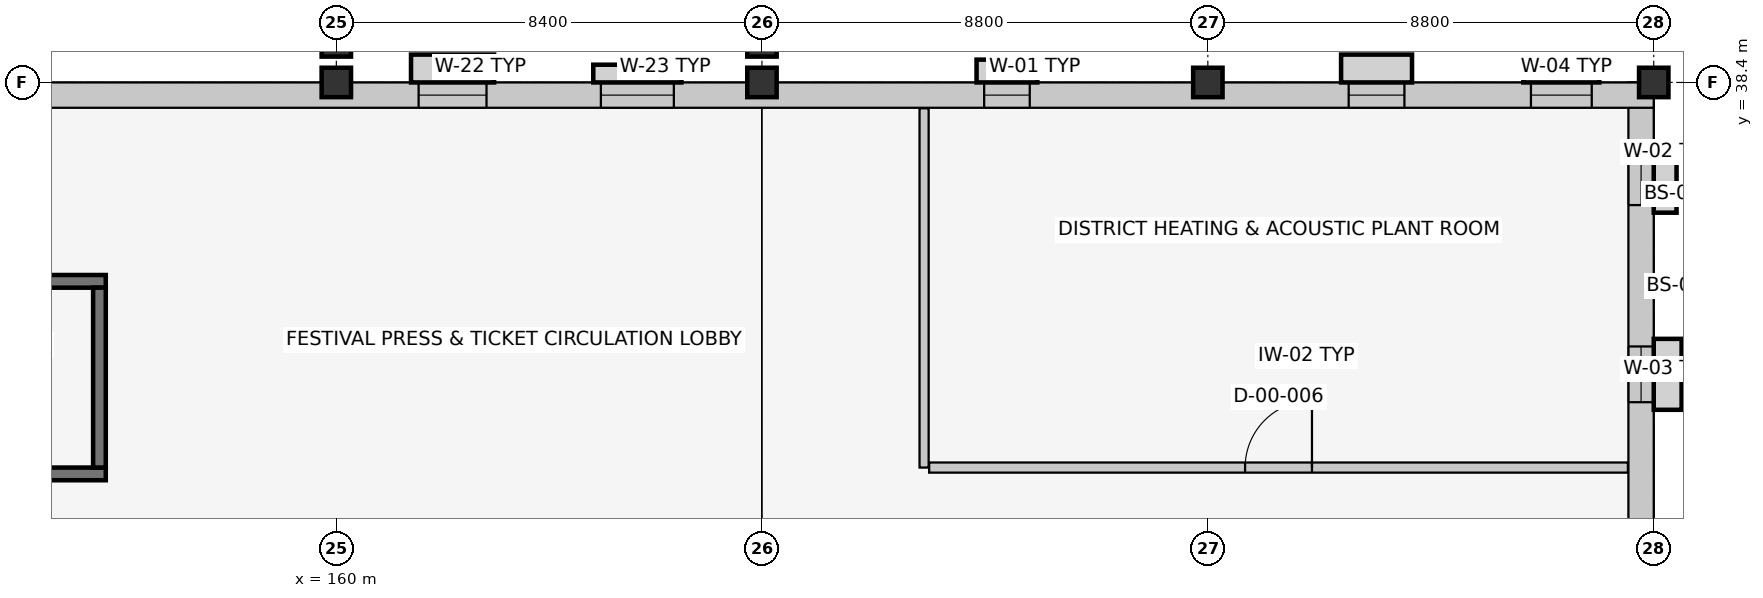
"""IFC4 building model, lengths in metres.
Left out: names, types, materials, properties, quantities, classifications, styles, units other than length and angle.
Written with IfcOpenShell. Run it as: python <this file> out.ifc"""

import sys

from ifc_helpers import new_model, si_unit, direction, frame, frame_2d, origin, origin_2d, place, context, subcontext, project, spatial, rectangle, extrude, element, fill, save


model = new_model("IFC4")
c1 = context("Model", 3, precision=1e-05, world=origin(), true_north=direction((0.0, 1.0)))
c2 = subcontext(c1, "Body", "Model", "MODEL_VIEW")
j1 = project(units=[si_unit("LENGTHUNIT", "METRE"), si_unit("PLANEANGLEUNIT", "RADIAN")], contexts=[c1])
p1 = place(None, origin())
s1 = spatial("IfcSite", under=j1, at=p1, CompositionType="ELEMENT")
p2 = place(p1, origin())
s2 = spatial("IfcBuilding", under=s1, at=p2, CompositionType="ELEMENT")
p3 = place(p2, origin())
s3 = spatial("IfcBuildingStorey", under=s2, at=p3, CompositionType="ELEMENT", Elevation=0.0)
for number, where, z_axis, x_axis in (
    (1, (160.0, 38.4, 0.0), (0.0, 0.0, 1.0), (1.0, 0.0, 0.0)),
    (2, (168.4, 38.4, 0.0), (0.0, 0.0, 1.0), (1.0, 0.0, 0.0)),
    (3, (177.2, 38.4, 0.0), (0.0, 0.0, 1.0), (1.0, 0.0, 0.0)),
    (4, (186.0, 38.4, 0.0), (0.0, 0.0, 1.0), (1.0, 0.0, 0.0)),
    (5, (160.0, 39.2, 0.0), (0.0, 0.0, 1.0), (1.0, 0.0, 0.0)),
    (6, (168.4, 39.2, 0.0), (0.0, 0.0, 1.0), (1.0, 0.0, 0.0)),
):
    element("IfcColumn", number, at=place(p3, frame(where, z_axis=z_axis, x_axis=x_axis)), inside=s3, PredefinedType="COLUMN", context=c2, shape_type="SweptSolid", body=[
        extrude(rectangle(XDim=0.58, YDim=0.58, at=origin_2d()), origin(), (0.0, 0.0, 1.0), 5.4),
    ])
p4 = place(p3, frame((185.75, 38.4, 0.0), z_axis=(0.0, 0.0, 1.0), x_axis=(0.0, -1.0, 0.0)))
e7 = element("IfcWall", 7, at=p4, inside=s3, PredefinedType="SOLIDWALL", context=c2, shape_type="SweptSolid", body=[
    extrude(rectangle(XDim=38.4, YDim=0.5, at=frame_2d((19.2, 0.0))), origin(), (0.0, 0.0, 1.0), 4.275),
])
p5 = place(p4, frame((1.42, 0.0, 0.9)))
e8 = element("IfcOpeningElement", 8, at=p5, cuts=e7, PredefinedType="OPENING", context=c2, shape_type="SweptSolid", body=[
    extrude(rectangle(XDim=1.0, YDim=1.35, at=frame_2d((0.5, 0.675))), frame((0.0, 0.262, 0.0), z_axis=(0.0, -1.0, 0.0), x_axis=(1.0, 0.0, 0.0)), (0.0, 0.0, 1.0), 0.524),
])
p6 = place(p4, frame((5.21, 0.0, 0.9)))
e9 = element("IfcOpeningElement", 9, at=p6, cuts=e7, PredefinedType="OPENING", context=c2, shape_type="SweptSolid", body=[
    extrude(rectangle(XDim=1.1, YDim=1.35, at=frame_2d((0.55, 0.675))), frame((0.0, 0.262, 0.0), z_axis=(0.0, -1.0, 0.0), x_axis=(1.0, 0.0, 0.0)), (0.0, 0.0, 1.0), 0.524),
])
p7 = place(p4, frame((20.645, 0.0, 0.9)))
e10 = element("IfcOpeningElement", 10, at=p7, cuts=e7, PredefinedType="OPENING", context=c2, shape_type="SweptSolid", body=[
    extrude(rectangle(XDim=0.95, YDim=1.45, at=frame_2d((0.475, 0.725))), frame((0.0, 0.262, 0.0), z_axis=(0.0, -1.0, 0.0), x_axis=(1.0, 0.0, 0.0)), (0.0, 0.0, 1.0), 0.524),
])
p8 = place(p4, frame((28.225, 0.0, 0.9)))
e11 = element("IfcOpeningElement", 11, at=p8, cuts=e7, PredefinedType="OPENING", context=c2, shape_type="SweptSolid", body=[
    extrude(rectangle(XDim=1.15, YDim=1.45, at=frame_2d((0.575, 0.725))), frame((0.0, 0.262, 0.0), z_axis=(0.0, -1.0, 0.0), x_axis=(1.0, 0.0, 0.0)), (0.0, 0.0, 1.0), 0.524),
])
p9 = place(p4, frame((35.805, 0.0, 0.9)))
e12 = element("IfcOpeningElement", 12, at=p9, cuts=e7, PredefinedType="OPENING", context=c2, shape_type="SweptSolid", body=[
    extrude(rectangle(XDim=1.35, YDim=1.45, at=frame_2d((0.675, 0.725))), frame((0.0, 0.262, 0.0), z_axis=(0.0, -1.0, 0.0), x_axis=(1.0, 0.0, 0.0)), (0.0, 0.0, 1.0), 0.524),
])
p10 = place(p3, frame((124.0, 38.15, 0.0), z_axis=(0.0, 0.0, 1.0), x_axis=(1.0, 0.0, 0.0)))
e13 = element("IfcWall", 13, at=p10, inside=s3, PredefinedType="SOLIDWALL", context=c2, shape_type="SweptSolid", body=[
    extrude(rectangle(XDim=62.0, YDim=0.5, at=frame_2d((31.0, 0.0))), origin(), (0.0, 0.0, 1.0), 4.275),
])
p11 = place(p10, frame((17.1, 0.0, 0.0)))
e14 = element("IfcOpeningElement", 14, at=p11, cuts=e13, PredefinedType="OPENING", context=c2, shape_type="SweptSolid", body=[
    extrude(rectangle(XDim=1.8, YDim=2.3, at=frame_2d((0.9, 1.15))), frame((0.0, 0.262, 0.0), z_axis=(0.0, -1.0, 0.0), x_axis=(1.0, 0.0, 0.0)), (0.0, 0.0, 1.0), 0.524),
])
p12 = place(p10, frame((1.098, 0.0, 0.9)))
e15 = element("IfcOpeningElement", 15, at=p12, cuts=e13, PredefinedType="OPENING", context=c2, shape_type="SweptSolid", body=[
    extrude(rectangle(XDim=1.45, YDim=1.45, at=frame_2d((0.725, 0.725))), frame((0.0, 0.262, 0.0), z_axis=(0.0, -1.0, 0.0), x_axis=(1.0, 0.0, 0.0)), (0.0, 0.0, 1.0), 0.524),
])
p13 = place(p10, frame((26.853, 0.0, 0.9)))
e16 = element("IfcOpeningElement", 16, at=p13, cuts=e13, PredefinedType="OPENING", context=c2, shape_type="SweptSolid", body=[
    extrude(rectangle(XDim=1.0, YDim=1.75, at=frame_2d((0.5, 0.875))), frame((0.0, 0.262, 0.0), z_axis=(0.0, -1.0, 0.0), x_axis=(1.0, 0.0, 0.0)), (0.0, 0.0, 1.0), 0.524),
])
p14 = place(p10, frame((37.624, 0.0, 0.9)))
e17 = element("IfcOpeningElement", 17, at=p14, cuts=e13, PredefinedType="OPENING", context=c2, shape_type="SweptSolid", body=[
    extrude(rectangle(XDim=1.34, YDim=1.75, at=frame_2d((0.67, 0.875))), frame((0.0, 0.262, 0.0), z_axis=(0.0, -1.0, 0.0), x_axis=(1.0, 0.0, 0.0)), (0.0, 0.0, 1.0), 0.524),
])
p15 = place(p10, frame((41.221, 0.0, 0.9)))
e18 = element("IfcOpeningElement", 18, at=p15, cuts=e13, PredefinedType="OPENING", context=c2, shape_type="SweptSolid", body=[
    extrude(rectangle(XDim=1.44, YDim=1.75, at=frame_2d((0.72, 0.875))), frame((0.0, 0.262, 0.0), z_axis=(0.0, -1.0, 0.0), x_axis=(1.0, 0.0, 0.0)), (0.0, 0.0, 1.0), 0.524),
])
p16 = place(p10, frame((48.785, 0.0, 0.9)))
e19 = element("IfcOpeningElement", 19, at=p16, cuts=e13, PredefinedType="OPENING", context=c2, shape_type="SweptSolid", body=[
    extrude(rectangle(XDim=0.9, YDim=1.35, at=frame_2d((0.45, 0.675))), frame((0.0, 0.262, 0.0), z_axis=(0.0, -1.0, 0.0), x_axis=(1.0, 0.0, 0.0)), (0.0, 0.0, 1.0), 0.524),
])
p17 = place(p10, frame((55.979, 0.0, 0.9)))
e20 = element("IfcOpeningElement", 20, at=p17, cuts=e13, PredefinedType="OPENING", context=c2, shape_type="SweptSolid", body=[
    extrude(rectangle(XDim=1.1, YDim=1.35, at=frame_2d((0.55, 0.675))), frame((0.0, 0.262, 0.0), z_axis=(0.0, -1.0, 0.0), x_axis=(1.0, 0.0, 0.0)), (0.0, 0.0, 1.0), 0.524),
])
p18 = place(p10, frame((59.576, 0.0, 0.9)))
e21 = element("IfcOpeningElement", 21, at=p18, cuts=e13, PredefinedType="OPENING", context=c2, shape_type="SweptSolid", body=[
    extrude(rectangle(XDim=1.2, YDim=1.35, at=frame_2d((0.6, 0.675))), frame((0.0, 0.262, 0.0), z_axis=(0.0, -1.0, 0.0), x_axis=(1.0, 0.0, 0.0)), (0.0, 0.0, 1.0), 0.524),
])
for number, where, z_axis, x_axis in (
    (22, (146.55, 30.675, 0.0), (0.0, 0.0, 1.0), (1.0, 0.0, 0.0)),
    (23, (155.45, 34.475, 0.0), (0.0, 0.0, 1.0), (-1.0, 0.0, 0.0)),
):
    element("IfcWall", number, at=place(p3, frame(where, z_axis=z_axis, x_axis=x_axis)), inside=s3, PredefinedType="SHEAR", context=c2, shape_type="SweptSolid", body=[
        extrude(rectangle(XDim=8.9, YDim=0.25, at=frame_2d((4.45, 0.0))), origin(), (0.0, 0.0, 1.0), 5.12),
    ])
p19 = place(p3, frame((155.325, 30.8, 0.0), z_axis=(0.0, 0.0, 1.0), x_axis=(0.0, 1.0, 0.0)))
e24 = element("IfcWall", 24, at=p19, inside=s3, PredefinedType="SHEAR", context=c2, shape_type="SweptSolid", body=[
    extrude(rectangle(XDim=3.55, YDim=0.25, at=frame_2d((1.775, 0.0))), origin(), (0.0, 0.0, 1.0), 5.12),
])
p20 = place(p3, frame((171.6, 30.8, 0.0), z_axis=(0.0, 0.0, 1.0), x_axis=(0.0, 1.0, 0.0)))
e25 = element("IfcWall", 25, at=p20, inside=s3, PredefinedType="PARTITIONING", context=c2, shape_type="SweptSolid", body=[
    extrude(rectangle(XDim=7.09, YDim=0.18, at=frame_2d((3.545, 0.0))), origin(), (0.0, 0.0, 1.0), 5.12),
])
p21 = place(p3, frame((171.7, 30.8, 0.0), z_axis=(0.0, 0.0, 1.0), x_axis=(1.0, 0.0, 0.0)))
e26 = element("IfcWall", 26, at=p21, inside=s3, PredefinedType="PARTITIONING", context=c2, shape_type="SweptSolid", body=[
    extrude(rectangle(XDim=13.79, YDim=0.2, at=frame_2d((6.895, 0.0))), origin(), (0.0, 0.0, 1.0), 5.12),
])
p22 = place(p21, frame((6.235, 0.0, 0.0)))
e27 = element("IfcOpeningElement", 27, at=p22, cuts=e26, PredefinedType="OPENING", context=c2, shape_type="SweptSolid", body=[
    extrude(rectangle(XDim=1.32, YDim=2.15, at=frame_2d((0.66, 1.075))), frame((0.0, 0.112, 0.0), z_axis=(0.0, -1.0, 0.0), x_axis=(1.0, 0.0, 0.0)), (0.0, 0.0, 1.0), 0.224),
])
p23 = place(p5, origin())
e28 = element("IfcWindow", 28, at=p23, inside=s3, PartitioningType="SINGLE_PANEL", PredefinedType="WINDOW", context=c2, shape_type="SweptSolid", body=[
    extrude(rectangle(XDim=1.0, YDim=1.35, at=frame_2d((0.5, 0.675))), frame((0.0, 0.03, 0.0), z_axis=(0.0, -1.0, 0.0), x_axis=(1.0, 0.0, 0.0)), (0.0, 0.0, 1.0), 0.06),
])
fill(e8, e28)
p24 = place(p6, origin())
e29 = element("IfcWindow", 29, at=p24, inside=s3, PartitioningType="SINGLE_PANEL", PredefinedType="WINDOW", context=c2, shape_type="SweptSolid", body=[
    extrude(rectangle(XDim=1.1, YDim=1.35, at=frame_2d((0.55, 0.675))), frame((0.0, 0.03, 0.0), z_axis=(0.0, -1.0, 0.0), x_axis=(1.0, 0.0, 0.0)), (0.0, 0.0, 1.0), 0.06),
])
fill(e9, e29)
p25 = place(p14, origin())
e30 = element("IfcWindow", 30, at=p25, inside=s3, PartitioningType="SINGLE_PANEL", PredefinedType="WINDOW", context=c2, shape_type="SweptSolid", body=[
    extrude(rectangle(XDim=1.34, YDim=1.75, at=frame_2d((0.67, 0.875))), frame((0.0, 0.03, 0.0), z_axis=(0.0, -1.0, 0.0), x_axis=(1.0, 0.0, 0.0)), (0.0, 0.0, 1.0), 0.06),
])
fill(e17, e30)
p26 = place(p15, origin())
e31 = element("IfcWindow", 31, at=p26, inside=s3, PartitioningType="SINGLE_PANEL", PredefinedType="WINDOW", context=c2, shape_type="SweptSolid", body=[
    extrude(rectangle(XDim=1.44, YDim=1.75, at=frame_2d((0.72, 0.875))), frame((0.0, 0.03, 0.0), z_axis=(0.0, -1.0, 0.0), x_axis=(1.0, 0.0, 0.0)), (0.0, 0.0, 1.0), 0.06),
])
fill(e18, e31)
p27 = place(p16, origin())
e32 = element("IfcWindow", 32, at=p27, inside=s3, PartitioningType="SINGLE_PANEL", PredefinedType="WINDOW", context=c2, shape_type="SweptSolid", body=[
    extrude(rectangle(XDim=0.9, YDim=1.35, at=frame_2d((0.45, 0.675))), frame((0.0, 0.03, 0.0), z_axis=(0.0, -1.0, 0.0), x_axis=(1.0, 0.0, 0.0)), (0.0, 0.0, 1.0), 0.06),
])
fill(e19, e32)
p28 = place(p17, origin())
e33 = element("IfcWindow", 33, at=p28, inside=s3, PartitioningType="SINGLE_PANEL", PredefinedType="WINDOW", context=c2, shape_type="SweptSolid", body=[
    extrude(rectangle(XDim=1.1, YDim=1.35, at=frame_2d((0.55, 0.675))), frame((0.0, 0.03, 0.0), z_axis=(0.0, -1.0, 0.0), x_axis=(1.0, 0.0, 0.0)), (0.0, 0.0, 1.0), 0.06),
])
fill(e20, e33)
p29 = place(p18, origin())
e34 = element("IfcWindow", 34, at=p29, inside=s3, PartitioningType="SINGLE_PANEL", PredefinedType="WINDOW", context=c2, shape_type="SweptSolid", body=[
    extrude(rectangle(XDim=1.2, YDim=1.35, at=frame_2d((0.6, 0.675))), frame((0.0, 0.03, 0.0), z_axis=(0.0, -1.0, 0.0), x_axis=(1.0, 0.0, 0.0)), (0.0, 0.0, 1.0), 0.06),
])
fill(e21, e34)
p30 = place(p22, origin())
e35 = element("IfcDoor", 35, at=p30, inside=s3, OperationType="SINGLE_SWING_RIGHT", PredefinedType="DOOR", context=c2, shape_type="SweptSolid", body=[
    extrude(rectangle(XDim=1.32, YDim=2.15, at=frame_2d((0.66, 1.075))), frame((0.0, 0.025, 0.0), z_axis=(0.0, -1.0, 0.0), x_axis=(1.0, 0.0, 0.0)), (0.0, 0.0, 1.0), 0.05),
])
fill(e27, e35)
save(model, sys.argv[1])
